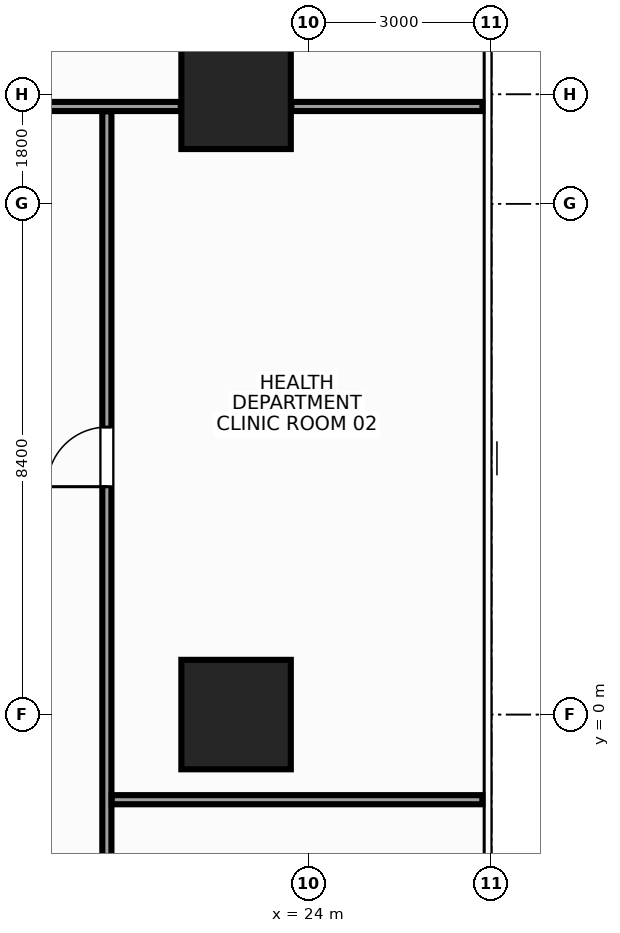
"""IFC4 building model, lengths in metres.
Left out: names, types, materials, properties, quantities, classifications, styles, units other than length and angle.
Written with IfcOpenShell. Run it as: python <this file> out.ifc"""

import sys

from ifc_helpers import new_model, si_unit, direction, frame, frame_2d, origin, origin_2d, place, context, subcontext, project, spatial, rectangle, extrude, source, transform, mapped, element, fill, save


model = new_model("IFC4")
c1 = context("Model", 3, precision=1e-05, world=origin(), true_north=direction((0.0, 1.0)))
c2 = subcontext(c1, "Body", "Model", "MODEL_VIEW")
j1 = project(units=[si_unit("LENGTHUNIT", "METRE"), si_unit("PLANEANGLEUNIT", "RADIAN")], contexts=[c1])
p1 = place(None, origin())
s1 = spatial("IfcSite", under=j1, at=p1, CompositionType="ELEMENT")
p2 = place(p1, origin())
s2 = spatial("IfcBuilding", under=s1, at=p2, CompositionType="ELEMENT")
p3 = place(p2, frame((0.0, 0.0, 45.2)))
s3 = spatial("IfcBuildingStorey", under=s2, at=p3, CompositionType="ELEMENT", Elevation=45.2)
m1 = source(origin(), c2, "Body", "SweptSolid", [
    extrude(rectangle(XDim=1.8, YDim=1.8, at=origin_2d()), origin(), (0.0, 0.0, 1.0), 3.6),
])
for number, where, z_axis, x_axis in (
    (1, (22.8, 0.0, 0.0), (0.0, 0.0, 1.0), (1.0, 0.0, 0.0)),
    (2, (22.8, 10.2, 0.0), (0.0, 0.0, 1.0), (1.0, 0.0, 0.0)),
):
    element("IfcColumn", number, at=place(p3, frame(where, z_axis=z_axis, x_axis=x_axis)), inside=s3, PredefinedType="COLUMN", context=c2, shape_type="MappedRepresentation", body=[
        mapped(m1, transform((0.0, 0.0, 0.0), x_axis=(1.0, 0.0, 0.0), y_axis=(0.0, 1.0, 0.0), z_axis=(0.0, 0.0, 1.0), scale=1.0)),
    ])
m2 = source(origin(), c2, "Body", "SweptSolid", [
    extrude(rectangle(XDim=4.18, YDim=0.15, at=frame_2d((2.09, 0.0))), origin(), (0.0, 0.0, 1.0), 2.745),
])
p4 = place(p3, frame((17.71, 10.0, 0.0), z_axis=(0.0, 0.0, 1.0), x_axis=(1.0, 0.0, 0.0)))
e3 = element("IfcWall", 3, at=p4, inside=s3, PredefinedType="PARTITIONING", context=c2, shape_type="MappedRepresentation", body=[
    mapped(m2, transform((0.0, 0.0, 0.0), x_axis=(1.0, 0.0, 0.0), y_axis=(0.0, 1.0, 0.0), z_axis=(0.0, 0.0, 1.0), scale=1.0)),
])
m3 = source(origin(), c2, "Body", "SweptSolid", [
    extrude(rectangle(XDim=3.14, YDim=0.15, at=frame_2d((1.57, 0.0))), origin(), (0.0, 0.0, 1.0), 2.435),
])
p5 = place(p3, frame((23.71, 10.0, 0.0), z_axis=(0.0, 0.0, 1.0), x_axis=(1.0, 0.0, 0.0)))
e4 = element("IfcWall", 4, at=p5, inside=s3, PredefinedType="PARTITIONING", context=c2, shape_type="MappedRepresentation", body=[
    mapped(m3, transform((0.0, 0.0, 0.0), x_axis=(1.0, 0.0, 0.0), y_axis=(0.0, 1.0, 0.0), z_axis=(0.0, 0.0, 1.0), scale=1.0)),
])
m4 = source(origin(), c2, "Body", "SweptSolid", [
    extrude(rectangle(XDim=24.115, YDim=0.15, at=frame_2d((12.058, 0.0))), origin(), (0.0, 0.0, 1.0), 2.745),
])
p6 = place(p3, frame((20.675, -14.195, 0.0), z_axis=(0.0, 0.0, 1.0), x_axis=(0.0, 1.0, 0.0)))
e5 = element("IfcWall", 5, at=p6, inside=s3, PredefinedType="PARTITIONING", context=c2, shape_type="MappedRepresentation", body=[
    mapped(m4, transform((0.0, 0.0, 0.0), x_axis=(1.0, 0.0, 0.0), y_axis=(0.0, 1.0, 0.0), z_axis=(0.0, 0.0, 1.0), scale=1.0)),
])
p7 = place(p6, frame((17.942, 0.0, 0.0)))
e6 = element("IfcOpeningElement", 6, at=p7, cuts=e5, PredefinedType="OPENING", context=c2, shape_type="SweptSolid", body=[
    extrude(rectangle(XDim=0.98, YDim=2.15, at=frame_2d((0.49, 1.075))), frame((0.0, 0.087, 0.0), z_axis=(0.0, -1.0, 0.0), x_axis=(1.0, 0.0, 0.0)), (0.0, 0.0, 1.0), 0.174),
])
m5 = source(origin(), c2, "Body", "SweptSolid", [
    extrude(rectangle(XDim=6.095, YDim=0.15, at=frame_2d((3.048, 0.0))), origin(), (0.0, 0.0, 1.0), 2.745),
])
p8 = place(p3, frame((20.755, -1.4, 0.0), z_axis=(0.0, 0.0, 1.0), x_axis=(1.0, 0.0, 0.0)))
e7 = element("IfcWall", 7, at=p8, inside=s3, PredefinedType="PARTITIONING", context=c2, shape_type="MappedRepresentation", body=[
    mapped(m5, transform((0.0, 0.0, 0.0), x_axis=(1.0, 0.0, 0.0), y_axis=(0.0, 1.0, 0.0), z_axis=(0.0, 0.0, 1.0), scale=1.0)),
])
m6 = source(origin(), c2, "Body", "SweptSolid", [
    extrude(rectangle(XDim=0.98, YDim=2.15, at=frame_2d((0.49, 1.075))), frame((0.0, 0.025, 0.0), z_axis=(0.0, -1.0, 0.0), x_axis=(1.0, 0.0, 0.0)), (0.0, 0.0, 1.0), 0.05),
])
p9 = place(p7, origin())
e8 = element("IfcDoor", 8, at=p9, inside=s3, OperationType="SINGLE_SWING_LEFT", PredefinedType="DOOR", context=c2, shape_type="MappedRepresentation", body=[
    mapped(m6, transform((0.0, 0.0, 0.0), x_axis=(1.0, 0.0, 0.0), y_axis=(0.0, 1.0, 0.0), z_axis=(0.0, 0.0, 1.0), scale=1.0)),
])
fill(e6, e8)
save(model, sys.argv[1])
